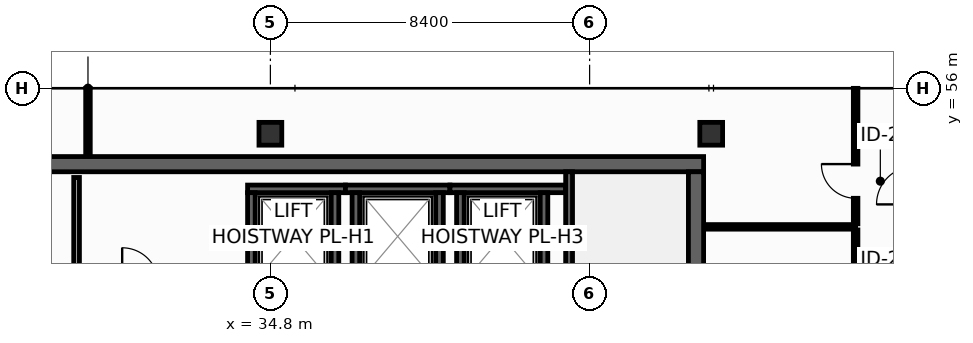
"""IFC4 building model, lengths in metres.
Left out: names, types, materials, properties, quantities, classifications, styles, units other than length and angle.
Written with IfcOpenShell. Run it as: python <this file> out.ifc"""

import sys

from ifc_helpers import new_model, si_unit, direction, frame, frame_2d, origin, origin_2d, place, context, subcontext, project, spatial, rectangle, hollow_rectangle, extrude, element, fill, save


model = new_model("IFC4")
c1 = context("Model", 3, precision=1e-05, world=origin(), true_north=direction((0.0, 1.0)))
c2 = subcontext(c1, "Body", "Model", "MODEL_VIEW")
j1 = project(units=[si_unit("LENGTHUNIT", "METRE"), si_unit("PLANEANGLEUNIT", "RADIAN")], contexts=[c1])
p1 = place(None, origin())
s1 = spatial("IfcSite", under=j1, at=p1, CompositionType="ELEMENT")
p2 = place(p1, origin())
s2 = spatial("IfcBuilding", under=s1, at=p2, CompositionType="ELEMENT")
p3 = place(p2, frame((0.0, 0.0, 272.4)))
s3 = spatial("IfcBuildingStorey", under=s2, at=p3, CompositionType="ELEMENT", Elevation=272.4)
p4 = place(p3, frame((13.7, 54.0, 0.0), z_axis=(0.0, 0.0, 1.0), x_axis=(1.0, 0.0, 0.0)))
e1 = element("IfcWall", 1, at=p4, inside=s3, PredefinedType="SHEAR", context=c2, shape_type="SweptSolid", body=[
    extrude(rectangle(XDim=32.5, YDim=0.4, at=frame_2d((16.25, 0.0))), origin(), (0.0, 0.0, 1.0), 3.35),
])
p5 = place(p3, frame((46.0, 43.4, 0.0), z_axis=(0.0, 0.0, 1.0), x_axis=(0.0, 1.0, 0.0)))
e2 = element("IfcWall", 2, at=p5, inside=s3, PredefinedType="SHEAR", context=c2, shape_type="SweptSolid", body=[
    extrude(rectangle(XDim=10.4, YDim=0.4, at=frame_2d((5.2, 0.0))), origin(), (0.0, 0.0, 1.0), 3.35),
])
for number, where, z_axis, x_axis in (
    (3, (34.8, 54.8, 0.0), (0.0, 0.0, 1.0), (1.0, 0.0, 0.0)),
    (4, (46.4, 54.8, 0.0), (0.0, 0.0, 1.0), (1.0, 0.0, 0.0)),
):
    element("IfcColumn", number, at=place(p3, frame(where, z_axis=z_axis, x_axis=x_axis)), inside=s3, PredefinedType="COLUMN", context=c2, shape_type="SweptSolid", body=[
        extrude(hollow_rectangle(XDim=0.6, YDim=0.6, WallThickness=0.028, at=origin_2d()), origin(), (0.0, 0.0, 1.0), 3.8),
    ])
p6 = place(p3, frame((34.2, 53.35, 0.0), z_axis=(0.0, 0.0, 1.0), x_axis=(1.0, 0.0, 0.0)))
e5 = element("IfcWall", 5, at=p6, inside=s3, PredefinedType="SHEAR", context=c2, shape_type="SweptSolid", body=[
    extrude(rectangle(XDim=2.575, YDim=0.2, at=frame_2d((1.288, 0.0))), origin(), (0.0, 0.0, 1.0), 3.35),
])
for number, where, z_axis, x_axis in (
    (6, (34.3, 50.95, 0.0), (0.0, 0.0, 1.0), (0.0, 1.0, 0.0)),
    (7, (36.5, 50.95, 0.0), (0.0, 0.0, 1.0), (0.0, 1.0, 0.0)),
):
    element("IfcWall", number, at=place(p3, frame(where, z_axis=z_axis, x_axis=x_axis)), inside=s3, PredefinedType="SHEAR", context=c2, shape_type="SweptSolid", body=[
        extrude(rectangle(XDim=2.3, YDim=0.2, at=frame_2d((1.15, 0.0))), origin(), (0.0, 0.0, 1.0), 3.35),
    ])
p7 = place(p3, frame((36.775, 53.35, 0.0), z_axis=(0.0, 0.0, 1.0), x_axis=(1.0, 0.0, 0.0)))
e8 = element("IfcWall", 8, at=p7, inside=s3, PredefinedType="SHEAR", context=c2, shape_type="SweptSolid", body=[
    extrude(rectangle(XDim=2.75, YDim=0.2, at=frame_2d((1.375, 0.0))), origin(), (0.0, 0.0, 1.0), 3.35),
])
for number, where, z_axis, x_axis in (
    (9, (37.05, 50.95, 0.0), (0.0, 0.0, 1.0), (0.0, 1.0, 0.0)),
    (10, (39.25, 50.95, 0.0), (0.0, 0.0, 1.0), (0.0, 1.0, 0.0)),
):
    element("IfcWall", number, at=place(p3, frame(where, z_axis=z_axis, x_axis=x_axis)), inside=s3, PredefinedType="SHEAR", context=c2, shape_type="SweptSolid", body=[
        extrude(rectangle(XDim=2.3, YDim=0.2, at=frame_2d((1.15, 0.0))), origin(), (0.0, 0.0, 1.0), 3.35),
    ])
p8 = place(p3, frame((39.525, 53.35, 0.0), z_axis=(0.0, 0.0, 1.0), x_axis=(1.0, 0.0, 0.0)))
e11 = element("IfcWall", 11, at=p8, inside=s3, PredefinedType="SHEAR", context=c2, shape_type="SweptSolid", body=[
    extrude(rectangle(XDim=3.045, YDim=0.2, at=frame_2d((1.522, 0.0))), origin(), (0.0, 0.0, 1.0), 3.35),
])
for number, where, z_axis, x_axis in (
    (12, (39.8, 50.95, 0.0), (0.0, 0.0, 1.0), (0.0, 1.0, 0.0)),
    (13, (42.0, 50.95, 0.0), (0.0, 0.0, 1.0), (0.0, 1.0, 0.0)),
):
    element("IfcWall", number, at=place(p3, frame(where, z_axis=z_axis, x_axis=x_axis)), inside=s3, PredefinedType="SHEAR", context=c2, shape_type="SweptSolid", body=[
        extrude(rectangle(XDim=2.3, YDim=0.2, at=frame_2d((1.15, 0.0))), origin(), (0.0, 0.0, 1.0), 3.35),
    ])
p9 = place(p3, frame((42.66, 53.8, 0.0), z_axis=(0.0, 0.0, 1.0), x_axis=(0.0, -1.0, 0.0)))
e14 = element("IfcWall", 14, at=p9, inside=s3, PredefinedType="SHEAR", context=c2, shape_type="SweptSolid", body=[
    extrude(rectangle(XDim=10.4, YDim=0.18, at=frame_2d((5.2, 0.0))), origin(), (0.0, 0.0, 1.0), 3.35),
])
p10 = place(p9, frame((8.99, 0.0, 0.0)))
e15 = element("IfcOpeningElement", 15, at=p10, cuts=e14, PredefinedType="OPENING", context=c2, shape_type="SweptSolid", body=[
    extrude(rectangle(XDim=1.1, YDim=2.15, at=frame_2d((0.55, 1.075))), frame((0.0, 0.1, 0.0), z_axis=(0.0, -1.0, 0.0), x_axis=(1.0, 0.0, 0.0)), (0.0, 0.0, 1.0), 0.2),
])
p11 = place(p3, frame((29.7, 50.95, 0.0), z_axis=(0.0, 0.0, 1.0), x_axis=(0.0, 1.0, 0.0)))
e16 = element("IfcWall", 16, at=p11, inside=s3, PredefinedType="PARTITIONING", context=c2, shape_type="SweptSolid", body=[
    extrude(rectangle(XDim=2.7, YDim=0.15, at=frame_2d((1.35, 0.0))), origin(), (0.0, 0.0, 1.0), 3.35),
])
p12 = place(p3, frame((46.22, 52.35, 0.0), z_axis=(0.0, 0.0, 1.0), x_axis=(1.0, 0.0, 0.0)))
e17 = element("IfcWall", 17, at=p12, inside=s3, PredefinedType="PARTITIONING", context=c2, shape_type="SweptSolid", body=[
    extrude(rectangle(XDim=3.98, YDim=0.12, at=frame_2d((1.99, 0.0))), origin(), (0.0, 0.0, 1.0), 3.35),
])
p13 = place(p3, frame((30.0, 54.22, 0.0), z_axis=(0.0, 0.0, 1.0), x_axis=(0.0, 1.0, 0.0)))
e18 = element("IfcWall", 18, at=p13, inside=s3, PredefinedType="PARTITIONING", context=c2, shape_type="SweptSolid", body=[
    extrude(rectangle(XDim=1.775, YDim=0.12, at=frame_2d((0.888, 0.0))), origin(), (0.0, 0.0, 1.0), 2.735),
])
p14 = place(p3, frame((50.2, 48.29, 0.0), z_axis=(0.0, 0.0, 1.0), x_axis=(0.0, 1.0, 0.0)))
e19 = element("IfcWall", 19, at=p14, inside=s3, PredefinedType="PARTITIONING", context=c2, shape_type="SweptSolid", body=[
    extrude(rectangle(XDim=3.98, YDim=0.12, at=frame_2d((1.99, 0.0))), origin(), (0.0, 0.0, 1.0), 3.35),
])
p15 = place(p14, frame((1.54, 0.0, 0.0)))
e20 = element("IfcOpeningElement", 20, at=p15, cuts=e19, PredefinedType="OPENING", context=c2, shape_type="SweptSolid", body=[
    extrude(rectangle(XDim=0.9, YDim=2.1, at=frame_2d((0.45, 1.05))), frame((0.0, 0.07, 0.0), z_axis=(0.0, -1.0, 0.0), x_axis=(1.0, 0.0, 0.0)), (0.0, 0.0, 1.0), 0.14),
])
p16 = place(p3, frame((50.2, 52.43, 0.0), z_axis=(0.0, 0.0, 1.0), x_axis=(0.0, 1.0, 0.0)))
e21 = element("IfcWall", 21, at=p16, inside=s3, PredefinedType="PARTITIONING", context=c2, shape_type="SweptSolid", body=[
    extrude(rectangle(XDim=3.565, YDim=0.12, at=frame_2d((1.783, 0.0))), origin(), (0.0, 0.0, 1.0), 2.735),
])
p17 = place(p16, frame((0.672, 0.0, 0.0)))
e22 = element("IfcOpeningElement", 22, at=p17, cuts=e21, PredefinedType="OPENING", context=c2, shape_type="SweptSolid", body=[
    extrude(rectangle(XDim=0.9, YDim=2.1, at=frame_2d((0.45, 1.05))), frame((0.0, 0.07, 0.0), z_axis=(0.0, -1.0, 0.0), x_axis=(1.0, 0.0, 0.0)), (0.0, 0.0, 1.0), 0.14),
])
p18 = place(p17, origin())
e23 = element("IfcDoor", 23, at=p18, inside=s3, OperationType="SINGLE_SWING_RIGHT", PredefinedType="DOOR", context=c2, shape_type="SweptSolid", body=[
    extrude(rectangle(XDim=0.9, YDim=2.1, at=frame_2d((0.45, 1.05))), frame((0.0, 0.025, 0.0), z_axis=(0.0, -1.0, 0.0), x_axis=(1.0, 0.0, 0.0)), (0.0, 0.0, 1.0), 0.05),
])
fill(e22, e23)
save(model, sys.argv[1])
